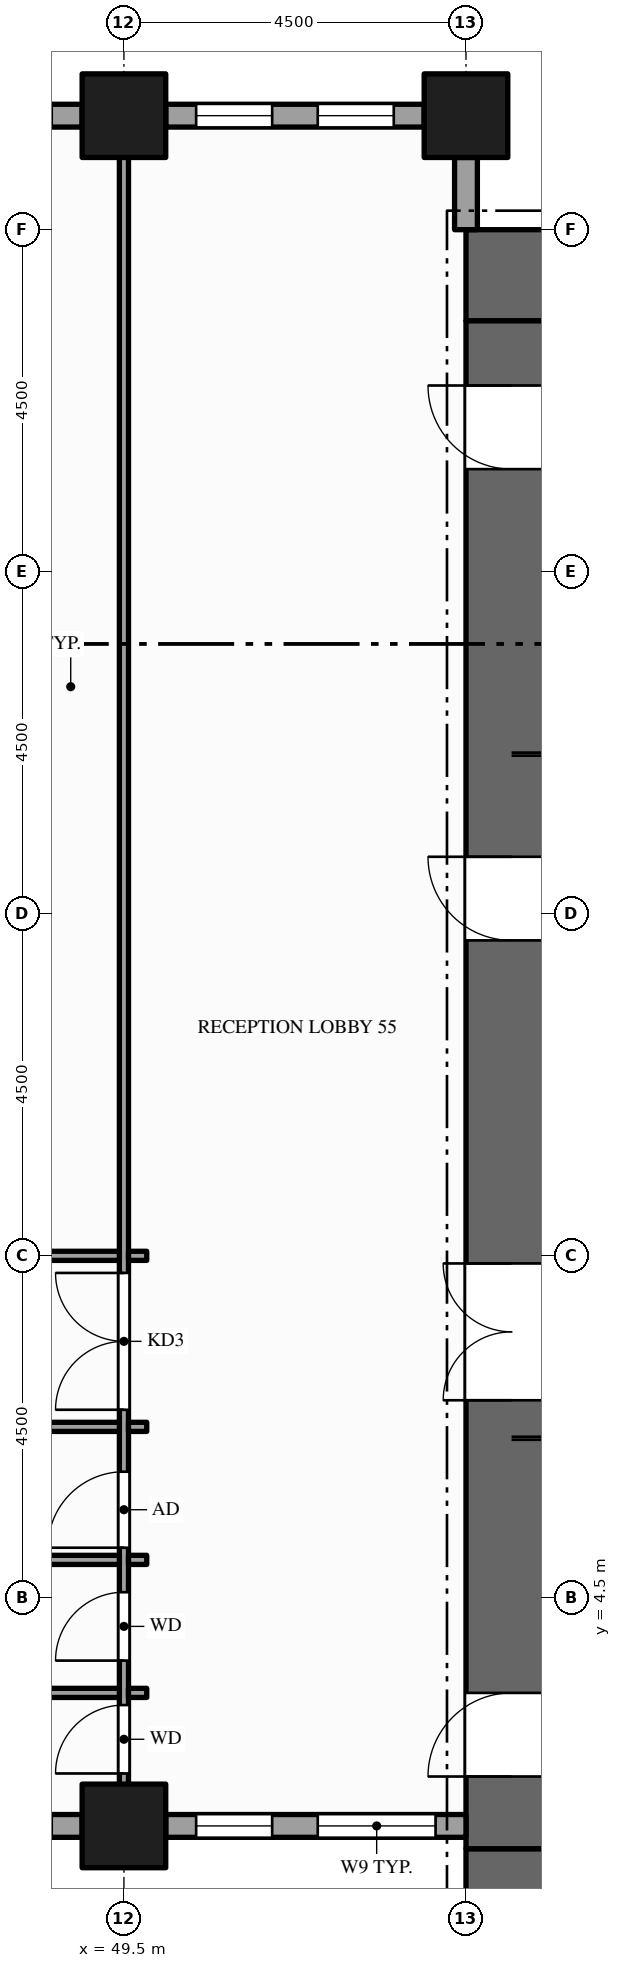
"""IFC4 building model, lengths in metres.
Left out: names, types, materials, properties, quantities, classifications, styles, units other than length and angle.
Written with IfcOpenShell. Run it as: python <this file> out.ifc"""

import sys

from ifc_helpers import new_model, si_unit, direction, frame, frame_2d, origin, origin_2d, place, context, subcontext, project, spatial, rectangle, hollow_rectangle, extrude, element, fill, save


model = new_model("IFC4")
c1 = context("Model", 3, precision=1e-05, world=origin(), true_north=direction((0.0, 1.0)))
c2 = subcontext(c1, "Body", "Model", "MODEL_VIEW")
j1 = project(units=[si_unit("LENGTHUNIT", "METRE"), si_unit("PLANEANGLEUNIT", "RADIAN")], contexts=[c1])
p1 = place(None, origin())
s1 = spatial("IfcSite", under=j1, at=p1, CompositionType="ELEMENT")
p2 = place(p1, origin())
s2 = spatial("IfcBuilding", under=s1, at=p2, CompositionType="ELEMENT")
p3 = place(p2, frame((0.0, 0.0, 49.0)))
s3 = spatial("IfcBuildingStorey", under=s2, at=p3, CompositionType="ELEMENT", Elevation=49.0)
for number, where, z_axis, x_axis in (
    (1, (67.5, 0.6, -0.15), (0.0, 0.0, 1.0), (-1.0, 0.0, 0.0)),
    (2, (54.0, 21.9, -0.15), (0.0, 0.0, 1.0), (1.0, 0.0, 0.0)),
):
    element("IfcWall", number, at=place(p3, frame(where, z_axis=z_axis, x_axis=x_axis)), inside=s3, PredefinedType="SHEAR", context=c2, shape_type="SweptSolid", body=[
        extrude(rectangle(XDim=13.5, YDim=1.2, at=frame_2d((6.75, 0.0))), origin(), (0.0, 0.0, 1.0), 4.0),
    ])
p4 = place(p3, frame((54.6, 1.2, -0.15), z_axis=(0.0, 0.0, 1.0), x_axis=(0.0, 1.0, 0.0)))
e3 = element("IfcWall", 3, at=p4, inside=s3, PredefinedType="SHEAR", context=c2, shape_type="SweptSolid", body=[
    extrude(rectangle(XDim=20.1, YDim=1.2, at=frame_2d((10.05, 0.0))), origin(), (0.0, 0.0, 1.0), 4.0),
])
p5 = place(p4, frame((5.9, 0.0, 0.15)))
e4 = element("IfcOpeningElement", 4, at=p5, cuts=e3, PredefinedType="OPENING", context=c2, shape_type="SweptSolid", body=[
    extrude(rectangle(XDim=1.8, YDim=2.1, at=frame_2d((0.9, 1.05))), frame((0.0, 0.61, 0.0), z_axis=(0.0, -1.0, 0.0), x_axis=(1.0, 0.0, 0.0)), (0.0, 0.0, 1.0), 1.22),
])
p6 = place(p4, frame((11.95, 0.0, 0.15)))
e5 = element("IfcOpeningElement", 5, at=p6, cuts=e3, PredefinedType="OPENING", context=c2, shape_type="SweptSolid", body=[
    extrude(rectangle(XDim=1.1, YDim=2.1, at=frame_2d((0.55, 1.05))), frame((0.0, 0.61, 0.0), z_axis=(0.0, -1.0, 0.0), x_axis=(1.0, 0.0, 0.0)), (0.0, 0.0, 1.0), 1.22),
])
p7 = place(p4, frame((0.95, 0.0, 0.15)))
e6 = element("IfcOpeningElement", 6, at=p7, cuts=e3, PredefinedType="OPENING", context=c2, shape_type="SweptSolid", body=[
    extrude(rectangle(XDim=1.1, YDim=2.1, at=frame_2d((0.55, 1.05))), frame((0.0, 0.61, 0.0), z_axis=(0.0, -1.0, 0.0), x_axis=(1.0, 0.0, 0.0)), (0.0, 0.0, 1.0), 1.22),
])
p8 = place(p4, frame((18.15, 0.0, 0.15)))
e7 = element("IfcOpeningElement", 7, at=p8, cuts=e3, PredefinedType="OPENING", context=c2, shape_type="SweptSolid", body=[
    extrude(rectangle(XDim=1.1, YDim=2.1, at=frame_2d((0.55, 1.05))), frame((0.0, 0.61, 0.0), z_axis=(0.0, -1.0, 0.0), x_axis=(1.0, 0.0, 0.0)), (0.0, 0.0, 1.0), 1.22),
])
for number, where, z_axis, x_axis in (
    (8, (49.5, 1.5, -0.15), (0.0, 0.0, 1.0), (1.0, 0.0, 0.0)),
    (9, (49.5, 24.0, -0.15), (0.0, 0.0, 1.0), (1.0, 0.0, 0.0)),
    (10, (54.0, 24.0, -0.15), (0.0, 0.0, 1.0), (1.0, 0.0, 0.0)),
):
    element("IfcColumn", number, at=place(p3, frame(where, z_axis=z_axis, x_axis=x_axis)), inside=s3, PredefinedType="COLUMN", context=c2, shape_type="SweptSolid", body=[
        extrude(hollow_rectangle(XDim=1.1, YDim=1.1, WallThickness=0.06, at=origin_2d()), origin(), (0.0, 0.0, 1.0), 4.0),
    ])
p9 = place(p3, frame((45.55, 1.5, 0.0), z_axis=(0.0, 0.0, 1.0), x_axis=(1.0, 0.0, 0.0)))
e11 = element("IfcWall", 11, at=p9, inside=s3, PredefinedType="STANDARD", context=c2, shape_type="SweptSolid", body=[
    extrude(rectangle(XDim=3.4, YDim=0.3, at=frame_2d((1.7, 0.0))), origin(), (0.0, 0.0, 1.0), 3.144),
])
p10 = place(p9, frame((0.4, 0.0, 0.9)))
e12 = element("IfcOpeningElement", 12, at=p10, cuts=e11, PredefinedType="OPENING", context=c2, shape_type="SweptSolid", body=[
    extrude(rectangle(XDim=1.0, YDim=2.0, at=frame_2d((0.5, 1.0))), frame((0.0, 0.16, 0.0), z_axis=(0.0, -1.0, 0.0), x_axis=(1.0, 0.0, 0.0)), (0.0, 0.0, 1.0), 0.32),
])
p11 = place(p9, frame((2.0, 0.0, 0.9)))
e13 = element("IfcOpeningElement", 13, at=p11, cuts=e11, PredefinedType="OPENING", context=c2, shape_type="SweptSolid", body=[
    extrude(rectangle(XDim=1.0, YDim=2.0, at=frame_2d((0.5, 1.0))), frame((0.0, 0.16, 0.0), z_axis=(0.0, -1.0, 0.0), x_axis=(1.0, 0.0, 0.0)), (0.0, 0.0, 1.0), 0.32),
])
p12 = place(p3, frame((50.05, 1.5, 0.0), z_axis=(0.0, 0.0, 1.0), x_axis=(1.0, 0.0, 0.0)))
e14 = element("IfcWall", 14, at=p12, inside=s3, PredefinedType="STANDARD", context=c2, shape_type="SweptSolid", body=[
    extrude(rectangle(XDim=3.95, YDim=0.3, at=frame_2d((1.975, 0.0))), origin(), (0.0, 0.0, 1.0), 3.144),
])
p13 = place(p12, frame((0.4, 0.0, 0.9)))
e15 = element("IfcOpeningElement", 15, at=p13, cuts=e14, PredefinedType="OPENING", context=c2, shape_type="SweptSolid", body=[
    extrude(rectangle(XDim=1.0, YDim=2.0, at=frame_2d((0.5, 1.0))), frame((0.0, 0.16, 0.0), z_axis=(0.0, -1.0, 0.0), x_axis=(1.0, 0.0, 0.0)), (0.0, 0.0, 1.0), 0.32),
])
p14 = place(p12, frame((2.0, 0.0, 0.9)))
e16 = element("IfcOpeningElement", 16, at=p14, cuts=e14, PredefinedType="OPENING", context=c2, shape_type="SweptSolid", body=[
    extrude(rectangle(XDim=1.55, YDim=2.0, at=frame_2d((0.775, 1.0))), frame((0.0, 0.16, 0.0), z_axis=(0.0, -1.0, 0.0), x_axis=(1.0, 0.0, 0.0)), (0.0, 0.0, 1.0), 0.32),
])
p15 = place(p3, frame((54.0, 22.5, 0.0), z_axis=(0.0, 0.0, 1.0), x_axis=(0.0, 1.0, 0.0)))
e17 = element("IfcWall", 17, at=p15, inside=s3, PredefinedType="STANDARD", context=c2, shape_type="SweptSolid", body=[
    extrude(rectangle(XDim=0.95, YDim=0.3, at=frame_2d((0.475, 0.0))), origin(), (0.0, 0.0, 1.0), 3.144),
])
p16 = place(p3, frame((53.45, 24.0, 0.0), z_axis=(0.0, 0.0, 1.0), x_axis=(-1.0, 0.0, 0.0)))
e18 = element("IfcWall", 18, at=p16, inside=s3, PredefinedType="STANDARD", context=c2, shape_type="SweptSolid", body=[
    extrude(rectangle(XDim=3.4, YDim=0.3, at=frame_2d((1.7, 0.0))), origin(), (0.0, 0.0, 1.0), 3.144),
])
p17 = place(p16, frame((0.4, 0.0, 0.9)))
e19 = element("IfcOpeningElement", 19, at=p17, cuts=e18, PredefinedType="OPENING", context=c2, shape_type="SweptSolid", body=[
    extrude(rectangle(XDim=1.0, YDim=2.0, at=frame_2d((0.5, 1.0))), frame((0.0, 0.16, 0.0), z_axis=(0.0, -1.0, 0.0), x_axis=(1.0, 0.0, 0.0)), (0.0, 0.0, 1.0), 0.32),
])
p18 = place(p16, frame((2.0, 0.0, 0.9)))
e20 = element("IfcOpeningElement", 20, at=p18, cuts=e18, PredefinedType="OPENING", context=c2, shape_type="SweptSolid", body=[
    extrude(rectangle(XDim=1.0, YDim=2.0, at=frame_2d((0.5, 1.0))), frame((0.0, 0.16, 0.0), z_axis=(0.0, -1.0, 0.0), x_axis=(1.0, 0.0, 0.0)), (0.0, 0.0, 1.0), 0.32),
])
p19 = place(p3, frame((48.95, 24.0, 0.0), z_axis=(0.0, 0.0, 1.0), x_axis=(-1.0, 0.0, 0.0)))
e21 = element("IfcWall", 21, at=p19, inside=s3, PredefinedType="STANDARD", context=c2, shape_type="SweptSolid", body=[
    extrude(rectangle(XDim=3.4, YDim=0.3, at=frame_2d((1.7, 0.0))), origin(), (0.0, 0.0, 1.0), 3.144),
])
p20 = place(p19, frame((0.4, 0.0, 0.9)))
e22 = element("IfcOpeningElement", 22, at=p20, cuts=e21, PredefinedType="OPENING", context=c2, shape_type="SweptSolid", body=[
    extrude(rectangle(XDim=1.0, YDim=2.0, at=frame_2d((0.5, 1.0))), frame((0.0, 0.16, 0.0), z_axis=(0.0, -1.0, 0.0), x_axis=(1.0, 0.0, 0.0)), (0.0, 0.0, 1.0), 0.32),
])
p21 = place(p19, frame((2.0, 0.0, 0.9)))
e23 = element("IfcOpeningElement", 23, at=p21, cuts=e21, PredefinedType="OPENING", context=c2, shape_type="SweptSolid", body=[
    extrude(rectangle(XDim=1.0, YDim=2.0, at=frame_2d((0.5, 1.0))), frame((0.0, 0.16, 0.0), z_axis=(0.0, -1.0, 0.0), x_axis=(1.0, 0.0, 0.0)), (0.0, 0.0, 1.0), 0.32),
])
p22 = place(p3, frame((49.5, 1.65, 0.0), z_axis=(0.0, 0.0, 1.0), x_axis=(0.0, 1.0, 0.0)))
e24 = element("IfcWall", 24, at=p22, inside=s3, PredefinedType="PARTITIONING", context=c2, shape_type="SweptSolid", body=[
    extrude(rectangle(XDim=22.2, YDim=0.12, at=frame_2d((11.1, 0.0))), origin(), (0.0, 0.0, 1.0), 2.938),
])
p23 = place(p22, frame((5.325, 0.0, 0.0)))
e25 = element("IfcOpeningElement", 25, at=p23, cuts=e24, PredefinedType="OPENING", context=c2, shape_type="SweptSolid", body=[
    extrude(rectangle(XDim=1.8, YDim=2.1, at=frame_2d((0.9, 1.05))), frame((0.0, 0.07, 0.0), z_axis=(0.0, -1.0, 0.0), x_axis=(1.0, 0.0, 0.0)), (0.0, 0.0, 1.0), 0.14),
])
p24 = place(p22, frame((0.54, 0.0, 0.0)))
e26 = element("IfcOpeningElement", 26, at=p24, cuts=e24, PredefinedType="OPENING", context=c2, shape_type="SweptSolid", body=[
    extrude(rectangle(XDim=0.9, YDim=2.1, at=frame_2d((0.45, 1.05))), frame((0.0, 0.07, 0.0), z_axis=(0.0, -1.0, 0.0), x_axis=(1.0, 0.0, 0.0)), (0.0, 0.0, 1.0), 0.14),
])
p25 = place(p22, frame((2.025, 0.0, 0.0)))
e27 = element("IfcOpeningElement", 27, at=p25, cuts=e24, PredefinedType="OPENING", context=c2, shape_type="SweptSolid", body=[
    extrude(rectangle(XDim=0.9, YDim=2.1, at=frame_2d((0.45, 1.05))), frame((0.0, 0.07, 0.0), z_axis=(0.0, -1.0, 0.0), x_axis=(1.0, 0.0, 0.0)), (0.0, 0.0, 1.0), 0.14),
])
p26 = place(p22, frame((3.51, 0.0, 0.0)))
e28 = element("IfcOpeningElement", 28, at=p26, cuts=e24, PredefinedType="OPENING", context=c2, shape_type="SweptSolid", body=[
    extrude(rectangle(XDim=1.0, YDim=2.1, at=frame_2d((0.5, 1.05))), frame((0.0, 0.07, 0.0), z_axis=(0.0, -1.0, 0.0), x_axis=(1.0, 0.0, 0.0)), (0.0, 0.0, 1.0), 0.14),
])
p27 = place(p3, frame((45.06, 3.25, 0.0), z_axis=(0.0, 0.0, 1.0), x_axis=(1.0, 0.0, 0.0)))
e29 = element("IfcWall", 29, at=p27, inside=s3, PredefinedType="PARTITIONING", context=c2, shape_type="SweptSolid", body=[
    extrude(rectangle(XDim=4.38, YDim=0.12, at=frame_2d((2.19, 0.0))), origin(), (0.0, 0.0, 1.0), 2.938),
])
p28 = place(p3, frame((49.56, 3.25, 0.0), z_axis=(0.0, 0.0, 1.0), x_axis=(1.0, 0.0, 0.0)))
e30 = element("IfcWall", 30, at=p28, inside=s3, PredefinedType="PARTITIONING", context=c2, shape_type="SweptSolid", body=[
    extrude(rectangle(XDim=0.24, YDim=0.12, at=frame_2d((0.12, 0.0))), origin(), (0.0, 0.0, 1.0), 2.938),
])
p29 = place(p3, frame((45.06, 5.0, 0.0), z_axis=(0.0, 0.0, 1.0), x_axis=(1.0, 0.0, 0.0)))
e31 = element("IfcWall", 31, at=p29, inside=s3, PredefinedType="PARTITIONING", context=c2, shape_type="SweptSolid", body=[
    extrude(rectangle(XDim=4.38, YDim=0.12, at=frame_2d((2.19, 0.0))), origin(), (0.0, 0.0, 1.0), 2.938),
])
p30 = place(p3, frame((49.56, 5.0, 0.0), z_axis=(0.0, 0.0, 1.0), x_axis=(1.0, 0.0, 0.0)))
e32 = element("IfcWall", 32, at=p30, inside=s3, PredefinedType="PARTITIONING", context=c2, shape_type="SweptSolid", body=[
    extrude(rectangle(XDim=0.24, YDim=0.12, at=frame_2d((0.12, 0.0))), origin(), (0.0, 0.0, 1.0), 2.938),
])
p31 = place(p3, frame((45.06, 6.75, 0.0), z_axis=(0.0, 0.0, 1.0), x_axis=(1.0, 0.0, 0.0)))
e33 = element("IfcWall", 33, at=p31, inside=s3, PredefinedType="PARTITIONING", context=c2, shape_type="SweptSolid", body=[
    extrude(rectangle(XDim=4.38, YDim=0.12, at=frame_2d((2.19, 0.0))), origin(), (0.0, 0.0, 1.0), 2.938),
])
p32 = place(p3, frame((49.56, 6.75, 0.0), z_axis=(0.0, 0.0, 1.0), x_axis=(1.0, 0.0, 0.0)))
e34 = element("IfcWall", 34, at=p32, inside=s3, PredefinedType="PARTITIONING", context=c2, shape_type="SweptSolid", body=[
    extrude(rectangle(XDim=0.24, YDim=0.12, at=frame_2d((0.12, 0.0))), origin(), (0.0, 0.0, 1.0), 2.938),
])
p33 = place(p3, frame((45.06, 9.0, 0.0), z_axis=(0.0, 0.0, 1.0), x_axis=(1.0, 0.0, 0.0)))
e35 = element("IfcWall", 35, at=p33, inside=s3, PredefinedType="PARTITIONING", context=c2, shape_type="SweptSolid", body=[
    extrude(rectangle(XDim=4.38, YDim=0.12, at=frame_2d((2.19, 0.0))), origin(), (0.0, 0.0, 1.0), 2.938),
])
p34 = place(p33, frame((1.59, 0.0, 0.0)))
e36 = element("IfcOpeningElement", 36, at=p34, cuts=e35, PredefinedType="OPENING", context=c2, shape_type="SweptSolid", body=[
    extrude(rectangle(XDim=1.2, YDim=2.1, at=frame_2d((0.6, 1.05))), frame((0.0, 0.07, 0.0), z_axis=(0.0, -1.0, 0.0), x_axis=(1.0, 0.0, 0.0)), (0.0, 0.0, 1.0), 0.14),
])
p35 = place(p3, frame((49.56, 9.0, 0.0), z_axis=(0.0, 0.0, 1.0), x_axis=(1.0, 0.0, 0.0)))
e37 = element("IfcWall", 37, at=p35, inside=s3, PredefinedType="PARTITIONING", context=c2, shape_type="SweptSolid", body=[
    extrude(rectangle(XDim=0.24, YDim=0.12, at=frame_2d((0.12, 0.0))), origin(), (0.0, 0.0, 1.0), 2.938),
])
p36 = place(p13, origin())
e38 = element("IfcWindow", 38, at=p36, inside=s3, PartitioningType="SINGLE_PANEL", PredefinedType="WINDOW", context=c2, shape_type="SweptSolid", body=[
    extrude(rectangle(XDim=1.0, YDim=2.0, at=frame_2d((0.5, 1.0))), frame((0.0, 0.03, 0.0), z_axis=(0.0, -1.0, 0.0), x_axis=(1.0, 0.0, 0.0)), (0.0, 0.0, 1.0), 0.06),
])
fill(e15, e38)
p37 = place(p14, origin())
e39 = element("IfcWindow", 39, at=p37, inside=s3, PartitioningType="SINGLE_PANEL", PredefinedType="WINDOW", context=c2, shape_type="SweptSolid", body=[
    extrude(rectangle(XDim=1.55, YDim=2.0, at=frame_2d((0.775, 1.0))), frame((0.0, 0.03, 0.0), z_axis=(0.0, -1.0, 0.0), x_axis=(1.0, 0.0, 0.0)), (0.0, 0.0, 1.0), 0.06),
])
fill(e16, e39)
p38 = place(p17, origin())
e40 = element("IfcWindow", 40, at=p38, inside=s3, PartitioningType="SINGLE_PANEL", PredefinedType="WINDOW", context=c2, shape_type="SweptSolid", body=[
    extrude(rectangle(XDim=1.0, YDim=2.0, at=frame_2d((0.5, 1.0))), frame((0.0, 0.03, 0.0), z_axis=(0.0, -1.0, 0.0), x_axis=(1.0, 0.0, 0.0)), (0.0, 0.0, 1.0), 0.06),
])
fill(e19, e40)
p39 = place(p18, origin())
e41 = element("IfcWindow", 41, at=p39, inside=s3, PartitioningType="SINGLE_PANEL", PredefinedType="WINDOW", context=c2, shape_type="SweptSolid", body=[
    extrude(rectangle(XDim=1.0, YDim=2.0, at=frame_2d((0.5, 1.0))), frame((0.0, 0.03, 0.0), z_axis=(0.0, -1.0, 0.0), x_axis=(1.0, 0.0, 0.0)), (0.0, 0.0, 1.0), 0.06),
])
fill(e20, e41)
p40 = place(p5, origin())
e42 = element("IfcDoor", 42, at=p40, inside=s3, OperationType="DOUBLE_DOOR_SINGLE_SWING", PredefinedType="DOOR", context=c2, shape_type="SweptSolid", body=[
    extrude(rectangle(XDim=1.8, YDim=2.1, at=frame_2d((0.9, 1.05))), frame((0.0, 0.025, 0.0), z_axis=(0.0, -1.0, 0.0), x_axis=(1.0, 0.0, 0.0)), (0.0, 0.0, 1.0), 0.05),
])
fill(e4, e42)
p41 = place(p6, origin())
e43 = element("IfcDoor", 43, at=p41, inside=s3, OperationType="SINGLE_SWING_RIGHT", PredefinedType="DOOR", context=c2, shape_type="SweptSolid", body=[
    extrude(rectangle(XDim=1.1, YDim=2.1, at=frame_2d((0.55, 1.05))), frame((0.0, 0.025, 0.0), z_axis=(0.0, -1.0, 0.0), x_axis=(1.0, 0.0, 0.0)), (0.0, 0.0, 1.0), 0.05),
])
fill(e5, e43)
p42 = place(p7, origin())
e44 = element("IfcDoor", 44, at=p42, inside=s3, OperationType="SINGLE_SWING_LEFT", PredefinedType="DOOR", context=c2, shape_type="SweptSolid", body=[
    extrude(rectangle(XDim=1.1, YDim=2.1, at=frame_2d((0.55, 1.05))), frame((0.0, 0.025, 0.0), z_axis=(0.0, -1.0, 0.0), x_axis=(1.0, 0.0, 0.0)), (0.0, 0.0, 1.0), 0.05),
])
fill(e6, e44)
p43 = place(p8, origin())
e45 = element("IfcDoor", 45, at=p43, inside=s3, OperationType="SINGLE_SWING_RIGHT", PredefinedType="DOOR", context=c2, shape_type="SweptSolid", body=[
    extrude(rectangle(XDim=1.1, YDim=2.1, at=frame_2d((0.55, 1.05))), frame((0.0, 0.025, 0.0), z_axis=(0.0, -1.0, 0.0), x_axis=(1.0, 0.0, 0.0)), (0.0, 0.0, 1.0), 0.05),
])
fill(e7, e45)
p44 = place(p23, origin())
e46 = element("IfcDoor", 46, at=p44, inside=s3, OperationType="DOUBLE_DOOR_SINGLE_SWING", PredefinedType="DOOR", context=c2, shape_type="SweptSolid", body=[
    extrude(rectangle(XDim=1.8, YDim=2.1, at=frame_2d((0.9, 1.05))), frame((0.0, 0.025, 0.0), z_axis=(0.0, -1.0, 0.0), x_axis=(1.0, 0.0, 0.0)), (0.0, 0.0, 1.0), 0.05),
])
fill(e25, e46)
p45 = place(p24, origin())
e47 = element("IfcDoor", 47, at=p45, inside=s3, OperationType="SINGLE_SWING_LEFT", PredefinedType="DOOR", context=c2, shape_type="SweptSolid", body=[
    extrude(rectangle(XDim=0.9, YDim=2.1, at=frame_2d((0.45, 1.05))), frame((0.0, 0.025, 0.0), z_axis=(0.0, -1.0, 0.0), x_axis=(1.0, 0.0, 0.0)), (0.0, 0.0, 1.0), 0.05),
])
fill(e26, e47)
p46 = place(p25, origin())
e48 = element("IfcDoor", 48, at=p46, inside=s3, OperationType="SINGLE_SWING_LEFT", PredefinedType="DOOR", context=c2, shape_type="SweptSolid", body=[
    extrude(rectangle(XDim=0.9, YDim=2.1, at=frame_2d((0.45, 1.05))), frame((0.0, 0.025, 0.0), z_axis=(0.0, -1.0, 0.0), x_axis=(1.0, 0.0, 0.0)), (0.0, 0.0, 1.0), 0.05),
])
fill(e27, e48)
p47 = place(p26, origin())
e49 = element("IfcDoor", 49, at=p47, inside=s3, OperationType="SINGLE_SWING_LEFT", PredefinedType="DOOR", context=c2, shape_type="SweptSolid", body=[
    extrude(rectangle(XDim=1.0, YDim=2.1, at=frame_2d((0.5, 1.05))), frame((0.0, 0.025, 0.0), z_axis=(0.0, -1.0, 0.0), x_axis=(1.0, 0.0, 0.0)), (0.0, 0.0, 1.0), 0.05),
])
fill(e28, e49)
save(model, sys.argv[1])
